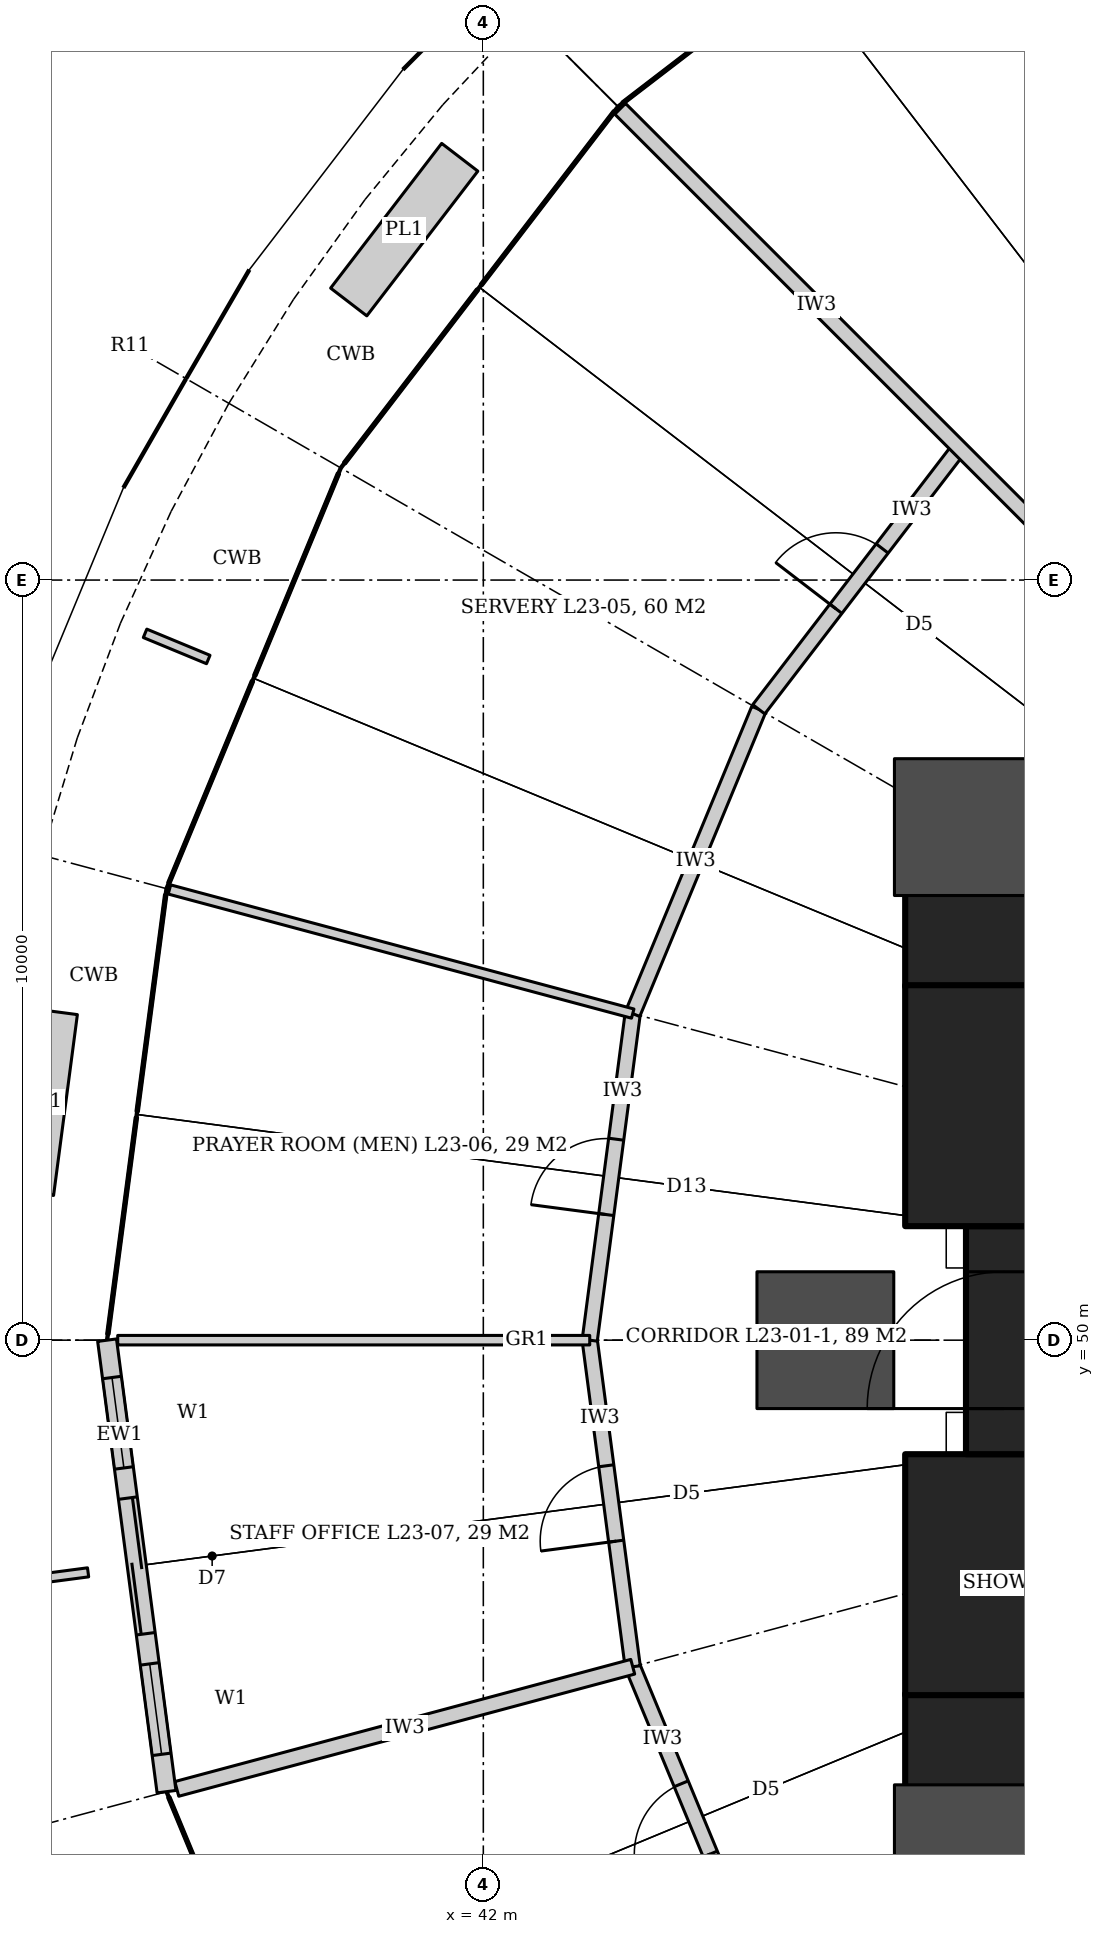
"""IFC4 building model, lengths in metres.
Left out: names, types, materials, properties, quantities, classifications, styles, units other than length and angle.
Written with IfcOpenShell. Run it as: python <this file> out.ifc"""

import sys

from ifc_helpers import new_model, si_unit, direction, frame, frame_2d, origin, origin_2d, place, context, subcontext, project, spatial, rectangle, hollow_circle, extrude, element, fill, save


model = new_model("IFC4")
c1 = context("Model", 3, precision=1e-05, world=origin(), true_north=direction((0.0, 1.0)))
c2 = subcontext(c1, "Body", "Model", "MODEL_VIEW")
j1 = project(units=[si_unit("LENGTHUNIT", "METRE"), si_unit("PLANEANGLEUNIT", "RADIAN")], contexts=[c1])
p1 = place(None, origin())
s1 = spatial("IfcSite", under=j1, at=p1, CompositionType="ELEMENT")
p2 = place(p1, origin())
s2 = spatial("IfcBuilding", under=s1, at=p2, CompositionType="ELEMENT")
p3 = place(p2, frame((0.0, 0.0, 105.8)))
s3 = spatial("IfcBuildingStorey", under=s2, at=p3, CompositionType="ELEMENT", Elevation=105.8)
for number, where, z_axis, x_axis in (
    (1, (47.55, 55.55, 0.0), (0.0, 0.0, 1.0), (1.0, 0.0, 0.0)),
    (2, (47.55, 44.45, 0.0), (0.0, 0.0, 1.0), (1.0, 0.0, 0.0)),
):
    element("IfcWall", number, at=place(p3, frame(where, z_axis=z_axis, x_axis=x_axis)), inside=s3, PredefinedType="SHEAR", context=c2, shape_type="SweptSolid", body=[
        extrude(rectangle(XDim=7.85, YDim=1.8, at=frame_2d((3.925, 0.0))), origin(), (0.0, 0.0, 1.0), 4.2),
    ])
p4 = place(p3, frame((48.45, 45.33, 0.0), z_axis=(0.0, 0.0, 1.0), x_axis=(0.0, 1.0, 0.0)))
e3 = element("IfcWall", 3, at=p4, inside=s3, PredefinedType="SHEAR", context=c2, shape_type="SweptSolid", body=[
    extrude(rectangle(XDim=3.17, YDim=1.8, at=frame_2d((1.585, 0.0))), origin(), (0.0, 0.0, 1.0), 4.2),
])
p5 = place(p3, frame((48.85, 48.5, 0.0), z_axis=(0.0, 0.0, 1.0), x_axis=(0.0, 1.0, 0.0)))
e4 = element("IfcWall", 4, at=p5, inside=s3, PredefinedType="SHEAR", context=c2, shape_type="SweptSolid", body=[
    extrude(rectangle(XDim=3.0, YDim=1.0, at=frame_2d((1.5, 0.0))), origin(), (0.0, 0.0, 1.0), 4.2),
])
p6 = place(p5, frame((0.6, 0.0, 0.0)))
e5 = element("IfcOpeningElement", 5, at=p6, cuts=e4, PredefinedType="OPENING", context=c2, shape_type="SweptSolid", body=[
    extrude(rectangle(XDim=1.8, YDim=2.1, at=frame_2d((0.9, 1.05))), frame((0.0, 0.51, 0.0), z_axis=(0.0, -1.0, 0.0), x_axis=(1.0, 0.0, 0.0)), (0.0, 0.0, 1.0), 1.02),
])
p7 = place(p3, frame((48.45, 51.5, 0.0), z_axis=(0.0, 0.0, 1.0), x_axis=(0.0, 1.0, 0.0)))
e6 = element("IfcWall", 6, at=p7, inside=s3, PredefinedType="SHEAR", context=c2, shape_type="SweptSolid", body=[
    extrude(rectangle(XDim=3.17, YDim=1.8, at=frame_2d((1.585, 0.0))), origin(), (0.0, 0.0, 1.0), 4.2),
])
for number, where, z_axis, x_axis in (
    (7, (48.309, 56.75, 0.0), (0.0, 0.0, 1.0), (1.0, 0.0, 0.0)),
    (8, (46.5, 50.0, 0.0), (0.0, 0.0, 1.0), (1.0, 0.0, 0.0)),
    (9, (48.309, 43.25, 0.0), (0.0, 0.0, 1.0), (1.0, 0.0, 0.0)),
):
    element("IfcColumn", number, at=place(p3, frame(where, z_axis=z_axis, x_axis=x_axis)), inside=s3, PredefinedType="COLUMN", context=c2, shape_type="SweptSolid", body=[
        extrude(hollow_circle(Radius=0.9, WallThickness=0.09, at=origin_2d()), origin(), (0.0, 0.0, 1.0), 4.2),
    ])
p8 = place(p3, frame((45.624, 41.7, 0.0), z_axis=(0.0, 0.0, 1.0), x_axis=(-0.382698425325, 0.923873322082, 0.0)))
e10 = element("IfcWall", 10, at=p8, inside=s3, PredefinedType="PARTITIONING", context=c2, shape_type="SweptSolid", body=[
    extrude(rectangle(XDim=4.333, YDim=0.2, at=frame_2d((2.167, 0.0))), origin(), (0.0, 0.0, 1.0), 3.04),
])
p9 = place(p8, frame((1.667, 0.0, 0.0)))
e11 = element("IfcOpeningElement", 11, at=p9, cuts=e10, PredefinedType="OPENING", context=c2, shape_type="SweptSolid", body=[
    extrude(rectangle(XDim=1.0, YDim=2.1, at=frame_2d((0.5, 1.05))), frame((0.0, 0.11, 0.0), z_axis=(0.0, -1.0, 0.0), x_axis=(1.0, 0.0, 0.0)), (0.0, 0.0, 1.0), 0.22),
])
p10 = place(p3, frame((43.966, 45.704, 0.0), z_axis=(0.0, 0.0, 1.0), x_axis=(-0.130536124221, 0.99144355375, 0.0)))
e12 = element("IfcWall", 12, at=p10, inside=s3, PredefinedType="PARTITIONING", context=c2, shape_type="SweptSolid", body=[
    extrude(rectangle(XDim=4.333, YDim=0.2, at=frame_2d((2.167, 0.0))), origin(), (0.0, 0.0, 1.0), 3.04),
])
p11 = place(p10, frame((1.667, 0.0, 0.0)))
e13 = element("IfcOpeningElement", 13, at=p11, cuts=e12, PredefinedType="OPENING", context=c2, shape_type="SweptSolid", body=[
    extrude(rectangle(XDim=1.0, YDim=2.1, at=frame_2d((0.5, 1.05))), frame((0.0, 0.11, 0.0), z_axis=(0.0, -1.0, 0.0), x_axis=(1.0, 0.0, 0.0)), (0.0, 0.0, 1.0), 0.22),
])
p12 = place(p3, frame((43.4, 50.0, 0.0), z_axis=(0.0, 0.0, 1.0), x_axis=(0.130536124221, 0.99144355375, 0.0)))
e14 = element("IfcWall", 14, at=p12, inside=s3, PredefinedType="PARTITIONING", context=c2, shape_type="SweptSolid", body=[
    extrude(rectangle(XDim=4.333, YDim=0.2, at=frame_2d((2.167, 0.0))), origin(), (0.0, 0.0, 1.0), 3.04),
])
p13 = place(p12, frame((1.667, 0.0, 0.0)))
e15 = element("IfcOpeningElement", 15, at=p13, cuts=e14, PredefinedType="OPENING", context=c2, shape_type="SweptSolid", body=[
    extrude(rectangle(XDim=1.0, YDim=2.4, at=frame_2d((0.5, 1.2))), frame((0.0, 0.11, 0.0), z_axis=(0.0, -1.0, 0.0), x_axis=(1.0, 0.0, 0.0)), (0.0, 0.0, 1.0), 0.22),
])
p14 = place(p3, frame((43.966, 54.296, 0.0), z_axis=(0.0, 0.0, 1.0), x_axis=(0.382698425325, 0.923873322082, 0.0)))
e16 = element("IfcWall", 16, at=p14, inside=s3, PredefinedType="PARTITIONING", context=c2, shape_type="SweptSolid", body=[
    extrude(rectangle(XDim=4.333, YDim=0.2, at=frame_2d((2.167, 0.0))), origin(), (0.0, 0.0, 1.0), 3.04),
])
p15 = place(p3, frame((45.624, 58.3, 0.0), z_axis=(0.0, 0.0, 1.0), x_axis=(0.60874374674, 0.79336690806, 0.0)))
e17 = element("IfcWall", 17, at=p15, inside=s3, PredefinedType="PARTITIONING", context=c2, shape_type="SweptSolid", body=[
    extrude(rectangle(XDim=4.333, YDim=0.2, at=frame_2d((2.167, 0.0))), origin(), (0.0, 0.0, 1.0), 3.04),
])
p16 = place(p15, frame((1.667, 0.0, 0.0)))
e18 = element("IfcOpeningElement", 18, at=p16, cuts=e17, PredefinedType="OPENING", context=c2, shape_type="SweptSolid", body=[
    extrude(rectangle(XDim=1.0, YDim=2.1, at=frame_2d((0.5, 1.05))), frame((0.0, 0.11, 0.0), z_axis=(0.0, -1.0, 0.0), x_axis=(1.0, 0.0, 0.0)), (0.0, 0.0, 1.0), 0.22),
])
p17 = place(p3, frame((53.55, 56.45, 0.0), z_axis=(0.0, 0.0, 1.0), x_axis=(-0.707106781187, 0.707106781187, 0.0)))
e19 = element("IfcWall", 19, at=p17, inside=s3, PredefinedType="PARTITIONING", context=c2, shape_type="SweptSolid", body=[
    extrude(rectangle(XDim=13.788, YDim=0.2, at=frame_2d((6.894, 0.0))), origin(), (0.0, 0.0, 1.0), 3.02),
])
p18 = place(p17, frame((2.739, 0.0, 0.0)))
e20 = element("IfcOpeningElement", 20, at=p18, cuts=e19, PredefinedType="OPENING", context=c2, shape_type="SweptSolid", body=[
    extrude(rectangle(XDim=2.0, YDim=2.1, at=frame_2d((1.0, 1.05))), frame((0.0, 0.11, 0.0), z_axis=(0.0, -1.0, 0.0), x_axis=(1.0, 0.0, 0.0)), (0.0, 0.0, 1.0), 0.22),
])
p19 = place(p3, frame((43.966, 54.296, 0.0), z_axis=(0.0, 0.0, 1.0), x_axis=(-0.965929227068, 0.258806352888, 0.0)))
e21 = element("IfcWall", 21, at=p19, inside=s3, PredefinedType="PARTITIONING", context=c2, shape_type="SweptSolid", body=[
    extrude(rectangle(XDim=6.31, YDim=0.125, at=frame_2d((3.155, 0.0))), origin(), (0.0, 0.0, 1.0), 3.04),
])
p20 = place(p3, frame((43.4, 50.0, 0.0), z_axis=(0.0, 0.0, 1.0), x_axis=(-1.0, 0.0, 0.0)))
e22 = element("IfcWall", 22, at=p20, inside=s3, PredefinedType="PARTITIONING", context=c2, shape_type="SweptSolid", body=[
    extrude(rectangle(XDim=6.21, YDim=0.125, at=frame_2d((3.105, 0.0))), origin(), (0.0, 0.0, 1.0), 3.04),
])
p21 = place(p3, frame((43.966, 45.704, 0.0), z_axis=(0.0, 0.0, 1.0), x_axis=(-0.965918392585, -0.25884678647, 0.0)))
e23 = element("IfcWall", 23, at=p21, inside=s3, PredefinedType="PARTITIONING", context=c2, shape_type="SweptSolid", body=[
    extrude(rectangle(XDim=6.21, YDim=0.2, at=frame_2d((3.105, 0.0))), origin(), (0.0, 0.0, 1.0), 3.04),
])
p22 = place(p3, frame((53.55, 43.55, 0.0), z_axis=(0.0, 0.0, 1.0), x_axis=(-0.707106781187, -0.707106781187, 0.0)))
e24 = element("IfcWall", 24, at=p22, inside=s3, PredefinedType="PARTITIONING", context=c2, shape_type="SweptSolid", body=[
    extrude(rectangle(XDim=13.788, YDim=0.2, at=frame_2d((6.894, 0.0))), origin(), (0.0, 0.0, 1.0), 3.02),
])
p23 = place(p22, frame((3.239, 0.0, 0.0)))
e25 = element("IfcOpeningElement", 25, at=p23, cuts=e24, PredefinedType="OPENING", context=c2, shape_type="SweptSolid", body=[
    extrude(rectangle(XDim=1.0, YDim=2.1, at=frame_2d((0.5, 1.05))), frame((0.0, 0.11, 0.0), z_axis=(0.0, -1.0, 0.0), x_axis=(1.0, 0.0, 0.0)), (0.0, 0.0, 1.0), 0.22),
])
p24 = place(p3, frame((37.05, 50.0, 0.0), z_axis=(0.0, 0.0, 1.0), x_axis=(0.130521975708, -0.991445416479, 0.0)))
e26 = element("IfcWall", 26, at=p24, inside=s3, PredefinedType="SOLIDWALL", context=c2, shape_type="SweptSolid", body=[
    extrude(rectangle(XDim=5.991, YDim=0.25, at=frame_2d((2.996, 0.0))), origin(), (0.0, 0.0, 1.0), 4.04),
])
p25 = place(p24, frame((2.095, 0.0, 0.0)))
e27 = element("IfcOpeningElement", 27, at=p25, cuts=e26, PredefinedType="OPENING", context=c2, shape_type="SweptSolid", body=[
    extrude(rectangle(XDim=1.8, YDim=2.4, at=frame_2d((0.9, 1.2))), frame((0.0, 0.135, 0.0), z_axis=(0.0, -1.0, 0.0), x_axis=(1.0, 0.0, 0.0)), (0.0, 0.0, 1.0), 0.27),
])
p26 = place(p24, frame((0.496, 0.0, 0.0)))
e28 = element("IfcOpeningElement", 28, at=p26, cuts=e26, PredefinedType="OPENING", context=c2, shape_type="SweptSolid", body=[
    extrude(rectangle(XDim=1.2, YDim=2.4, at=frame_2d((0.6, 1.2))), frame((0.0, 0.135, 0.0), z_axis=(0.0, -1.0, 0.0), x_axis=(1.0, 0.0, 0.0)), (0.0, 0.0, 1.0), 0.27),
])
p27 = place(p24, frame((4.296, 0.0, 0.0)))
e29 = element("IfcOpeningElement", 29, at=p27, cuts=e26, PredefinedType="OPENING", context=c2, shape_type="SweptSolid", body=[
    extrude(rectangle(XDim=1.2, YDim=2.4, at=frame_2d((0.6, 1.2))), frame((0.0, 0.135, 0.0), z_axis=(0.0, -1.0, 0.0), x_axis=(1.0, 0.0, 0.0)), (0.0, 0.0, 1.0), 0.27),
])
p28 = place(p16, origin())
e30 = element("IfcDoor", 30, at=p28, inside=s3, OperationType="SINGLE_SWING_LEFT", PredefinedType="DOOR", context=c2, shape_type="SweptSolid", body=[
    extrude(rectangle(XDim=1.0, YDim=2.1, at=frame_2d((0.5, 1.05))), frame((0.0, 0.025, 0.0), z_axis=(0.0, -1.0, 0.0), x_axis=(1.0, 0.0, 0.0)), (0.0, 0.0, 1.0), 0.05),
])
fill(e18, e30)
p29 = place(p13, origin())
e31 = element("IfcDoor", 31, at=p29, inside=s3, OperationType="SINGLE_SWING_LEFT", PredefinedType="DOOR", context=c2, shape_type="SweptSolid", body=[
    extrude(rectangle(XDim=1.0, YDim=2.4, at=frame_2d((0.5, 1.2))), frame((0.0, 0.025, 0.0), z_axis=(0.0, -1.0, 0.0), x_axis=(1.0, 0.0, 0.0)), (0.0, 0.0, 1.0), 0.05),
])
fill(e15, e31)
p30 = place(p11, origin())
e32 = element("IfcDoor", 32, at=p30, inside=s3, OperationType="SINGLE_SWING_LEFT", PredefinedType="DOOR", context=c2, shape_type="SweptSolid", body=[
    extrude(rectangle(XDim=1.0, YDim=2.1, at=frame_2d((0.5, 1.05))), frame((0.0, 0.025, 0.0), z_axis=(0.0, -1.0, 0.0), x_axis=(1.0, 0.0, 0.0)), (0.0, 0.0, 1.0), 0.05),
])
fill(e13, e32)
p31 = place(p9, origin())
e33 = element("IfcDoor", 33, at=p31, inside=s3, OperationType="SINGLE_SWING_LEFT", PredefinedType="DOOR", context=c2, shape_type="SweptSolid", body=[
    extrude(rectangle(XDim=1.0, YDim=2.1, at=frame_2d((0.5, 1.05))), frame((0.0, 0.025, 0.0), z_axis=(0.0, -1.0, 0.0), x_axis=(1.0, 0.0, 0.0)), (0.0, 0.0, 1.0), 0.05),
])
fill(e11, e33)
p32 = place(p25, origin())
e34 = element("IfcDoor", 34, at=p32, inside=s3, OperationType="DOUBLE_DOOR_SLIDING", PredefinedType="DOOR", context=c2, shape_type="SweptSolid", body=[
    extrude(rectangle(XDim=1.8, YDim=2.4, at=frame_2d((0.9, 1.2))), frame((0.0, 0.025, 0.0), z_axis=(0.0, -1.0, 0.0), x_axis=(1.0, 0.0, 0.0)), (0.0, 0.0, 1.0), 0.05),
])
fill(e27, e34)
p33 = place(p26, origin())
e35 = element("IfcWindow", 35, at=p33, inside=s3, PartitioningType="SINGLE_PANEL", PredefinedType="WINDOW", context=c2, shape_type="SweptSolid", body=[
    extrude(rectangle(XDim=1.2, YDim=2.4, at=frame_2d((0.6, 1.2))), frame((0.0, 0.03, 0.0), z_axis=(0.0, -1.0, 0.0), x_axis=(1.0, 0.0, 0.0)), (0.0, 0.0, 1.0), 0.06),
])
fill(e28, e35)
p34 = place(p27, origin())
e36 = element("IfcWindow", 36, at=p34, inside=s3, PartitioningType="SINGLE_PANEL", PredefinedType="WINDOW", context=c2, shape_type="SweptSolid", body=[
    extrude(rectangle(XDim=1.2, YDim=2.4, at=frame_2d((0.6, 1.2))), frame((0.0, 0.03, 0.0), z_axis=(0.0, -1.0, 0.0), x_axis=(1.0, 0.0, 0.0)), (0.0, 0.0, 1.0), 0.06),
])
fill(e29, e36)
p35 = place(p6, origin())
e37 = element("IfcDoor", 37, at=p35, inside=s3, OperationType="DOUBLE_DOOR_DOUBLE_SWING", PredefinedType="DOOR", context=c2, shape_type="SweptSolid", body=[
    extrude(rectangle(XDim=1.8, YDim=2.1, at=frame_2d((0.9, 1.05))), frame((0.0, 0.025, 0.0), z_axis=(0.0, -1.0, 0.0), x_axis=(1.0, 0.0, 0.0)), (0.0, 0.0, 1.0), 0.05),
])
fill(e5, e37)
save(model, sys.argv[1])
